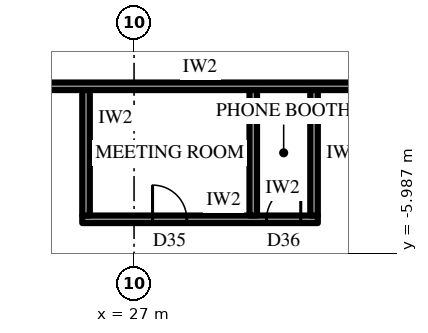
"""IFC4 building model, lengths in metres.
Left out: names, types, materials, properties, quantities, classifications, styles, units other than length and angle.
Written with IfcOpenShell. Run it as: python <this file> out.ifc"""

import sys

from ifc_helpers import new_model, si_unit, direction, frame, frame_2d, origin, place, context, subcontext, project, spatial, rectangle, extrude, element, fill, save


model = new_model("IFC4")
c1 = context("Model", 3, precision=1e-05, world=origin(), true_north=direction((0.0, 1.0)))
c2 = subcontext(c1, "Body", "Model", "MODEL_VIEW")
j1 = project(units=[si_unit("LENGTHUNIT", "METRE"), si_unit("PLANEANGLEUNIT", "RADIAN")], contexts=[c1])
p1 = place(None, origin())
s1 = spatial("IfcSite", under=j1, at=p1, CompositionType="ELEMENT")
p2 = place(p1, origin())
s2 = spatial("IfcBuilding", under=s1, at=p2, CompositionType="ELEMENT")
p3 = place(p2, frame((0.0, 0.0, 103.3)))
s3 = spatial("IfcBuildingStorey", under=s2, at=p3, CompositionType="ELEMENT", Elevation=103.3)
p4 = place(p3, frame((21.232, -30.925, 0.0), z_axis=(0.0, 0.0, 1.0), x_axis=(0.499999163675, 0.866025886636, 0.0)))
e1 = element("IfcWall", 1, at=p4, inside=s3, PredefinedType="SOLIDWALL", context=c2, shape_type="SweptSolid", body=[
    extrude(rectangle(XDim=32.332, YDim=0.3, at=frame_2d((16.166, 0.0))), origin(), (0.0, 0.0, 1.0), 2.2),
])
p5 = place(p4, frame((1.319, 0.0, 0.6)))
e2 = element("IfcOpeningElement", 2, at=p5, cuts=e1, PredefinedType="OPENING", context=c2, shape_type="SweptSolid", body=[
    extrude(rectangle(XDim=2.75, YDim=1.35, at=frame_2d((1.375, 0.675))), frame((0.0, 0.16, 0.0), z_axis=(0.0, -1.0, 0.0), x_axis=(1.0, 0.0, 0.0)), (0.0, 0.0, 1.0), 0.32),
])
p6 = place(p4, frame((6.708, 0.0, 0.6)))
e3 = element("IfcOpeningElement", 3, at=p6, cuts=e1, PredefinedType="OPENING", context=c2, shape_type="SweptSolid", body=[
    extrude(rectangle(XDim=2.75, YDim=1.35, at=frame_2d((1.375, 0.675))), frame((0.0, 0.16, 0.0), z_axis=(0.0, -1.0, 0.0), x_axis=(1.0, 0.0, 0.0)), (0.0, 0.0, 1.0), 0.32),
])
p7 = place(p4, frame((12.872, 0.0, 0.0)))
e4 = element("IfcOpeningElement", 4, at=p7, cuts=e1, PredefinedType="OPENING", context=c2, shape_type="SweptSolid", body=[
    extrude(rectangle(XDim=1.2, YDim=2.1, at=frame_2d((0.6, 1.05))), frame((0.0, 0.16, 0.0), z_axis=(0.0, -1.0, 0.0), x_axis=(1.0, 0.0, 0.0)), (0.0, 0.0, 1.0), 0.32),
])
p8 = place(p4, frame((17.485, 0.0, 0.6)))
e5 = element("IfcOpeningElement", 5, at=p8, cuts=e1, PredefinedType="OPENING", context=c2, shape_type="SweptSolid", body=[
    extrude(rectangle(XDim=2.75, YDim=1.35, at=frame_2d((1.375, 0.675))), frame((0.0, 0.16, 0.0), z_axis=(0.0, -1.0, 0.0), x_axis=(1.0, 0.0, 0.0)), (0.0, 0.0, 1.0), 0.32),
])
p9 = place(p4, frame((22.874, 0.0, 0.6)))
e6 = element("IfcOpeningElement", 6, at=p9, cuts=e1, PredefinedType="OPENING", context=c2, shape_type="SweptSolid", body=[
    extrude(rectangle(XDim=2.75, YDim=1.35, at=frame_2d((1.375, 0.675))), frame((0.0, 0.16, 0.0), z_axis=(0.0, -1.0, 0.0), x_axis=(1.0, 0.0, 0.0)), (0.0, 0.0, 1.0), 0.32),
])
p10 = place(p4, frame((28.262, 0.0, 0.6)))
e7 = element("IfcOpeningElement", 7, at=p10, cuts=e1, PredefinedType="OPENING", context=c2, shape_type="SweptSolid", body=[
    extrude(rectangle(XDim=2.75, YDim=1.35, at=frame_2d((1.375, 0.675))), frame((0.0, 0.16, 0.0), z_axis=(0.0, -1.0, 0.0), x_axis=(1.0, 0.0, 0.0)), (0.0, 0.0, 1.0), 0.32),
])
p11 = place(p3, frame((21.1, -1.6, 0.0), z_axis=(0.0, 0.0, 1.0), x_axis=(1.0, 0.0, 0.0)))
e8 = element("IfcWall", 8, at=p11, inside=s3, PredefinedType="PARTITIONING", context=c2, shape_type="SweptSolid", body=[
    extrude(rectangle(XDim=15.273, YDim=0.2, at=frame_2d((7.636, 0.0))), origin(), (0.0, 0.0, 1.0), 3.9),
])
p12 = place(p11, frame((1.027, 0.0, 0.0)))
e9 = element("IfcOpeningElement", 9, at=p12, cuts=e8, PredefinedType="OPENING", context=c2, shape_type="SweptSolid", body=[
    extrude(rectangle(XDim=1.0, YDim=2.2, at=frame_2d((0.5, 1.1))), frame((0.0, 0.11, 0.0), z_axis=(0.0, -1.0, 0.0), x_axis=(1.0, 0.0, 0.0)), (0.0, 0.0, 1.0), 0.22),
])
p13 = place(p3, frame((25.636, -5.1, 0.0), z_axis=(0.0, 0.0, 1.0), x_axis=(1.0, 0.0, 0.0)))
e10 = element("IfcWall", 10, at=p13, inside=s3, PredefinedType="PARTITIONING", context=c2, shape_type="SweptSolid", body=[
    extrude(rectangle(XDim=6.2, YDim=0.2, at=frame_2d((3.1, 0.0))), origin(), (0.0, 0.0, 1.0), 3.9),
])
p14 = place(p13, frame((1.85, 0.0, 0.0)))
e11 = element("IfcOpeningElement", 11, at=p14, cuts=e10, PredefinedType="OPENING", context=c2, shape_type="SweptSolid", body=[
    extrude(rectangle(XDim=0.9, YDim=2.2, at=frame_2d((0.45, 1.1))), frame((0.0, 0.11, 0.0), z_axis=(0.0, -1.0, 0.0), x_axis=(1.0, 0.0, 0.0)), (0.0, 0.0, 1.0), 0.22),
])
p15 = place(p13, frame((4.85, 0.0, 0.0)))
e12 = element("IfcOpeningElement", 12, at=p15, cuts=e10, PredefinedType="OPENING", context=c2, shape_type="SweptSolid", body=[
    extrude(rectangle(XDim=0.9, YDim=2.2, at=frame_2d((0.45, 1.1))), frame((0.0, 0.11, 0.0), z_axis=(0.0, -1.0, 0.0), x_axis=(1.0, 0.0, 0.0)), (0.0, 0.0, 1.0), 0.22),
])
for number, where, z_axis, x_axis in (
    (13, (25.737, -1.7, 0.0), (0.0, 0.0, 1.0), (0.0, -1.0, 0.0)),
    (14, (30.136, -1.7, 0.0), (0.0, 0.0, 1.0), (0.0, -1.0, 0.0)),
    (15, (31.737, -1.7, 0.0), (0.0, 0.0, 1.0), (0.0, -1.0, 0.0)),
):
    element("IfcWall", number, at=place(p3, frame(where, z_axis=z_axis, x_axis=x_axis)), inside=s3, PredefinedType="PARTITIONING", context=c2, shape_type="SweptSolid", body=[
        extrude(rectangle(XDim=3.3, YDim=0.2, at=frame_2d((1.65, 0.0))), origin(), (0.0, 0.0, 1.0), 3.9),
    ])
p16 = place(p14, origin())
e16 = element("IfcDoor", 16, at=p16, inside=s3, OperationType="SINGLE_SWING_RIGHT", PredefinedType="DOOR", context=c2, shape_type="SweptSolid", body=[
    extrude(rectangle(XDim=0.9, YDim=2.2, at=frame_2d((0.45, 1.1))), frame((0.0, 0.025, 0.0), z_axis=(0.0, -1.0, 0.0), x_axis=(1.0, 0.0, 0.0)), (0.0, 0.0, 1.0), 0.05),
])
fill(e11, e16)
p17 = place(p15, origin())
e17 = element("IfcDoor", 17, at=p17, inside=s3, OperationType="SINGLE_SWING_LEFT", PredefinedType="DOOR", context=c2, shape_type="SweptSolid", body=[
    extrude(rectangle(XDim=0.9, YDim=2.2, at=frame_2d((0.45, 1.1))), frame((0.0, 0.025, 0.0), z_axis=(0.0, -1.0, 0.0), x_axis=(1.0, 0.0, 0.0)), (0.0, 0.0, 1.0), 0.05),
])
fill(e12, e17)
save(model, sys.argv[1])
